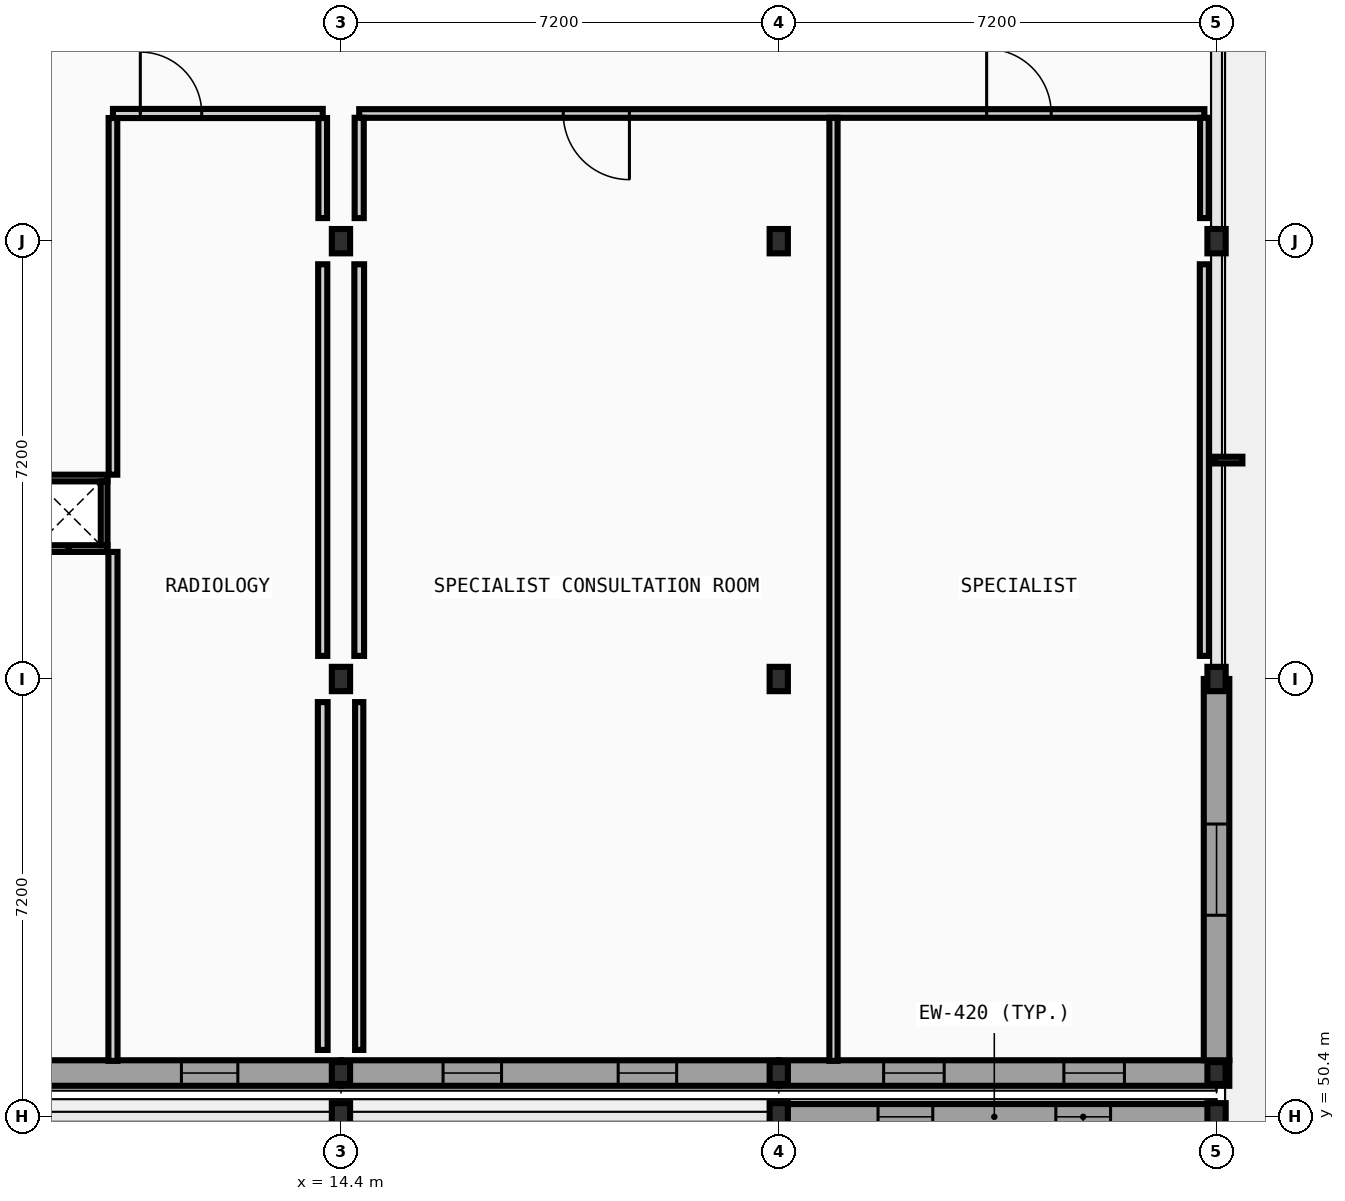
"""IFC4 building model, lengths in metres.
Left out: names, types, materials, properties, quantities, classifications, styles, units other than length and angle.
Written with IfcOpenShell. Run it as: python <this file> out.ifc"""

import sys

from ifc_helpers import new_model, si_unit, direction, frame, frame_2d, origin, origin_2d, place, context, subcontext, project, spatial, rectangle, i_section, extrude, element, fill, save


model = new_model("IFC4")
c1 = context("Model", 3, precision=1e-05, world=origin(), true_north=direction((0.0, 1.0)))
c2 = subcontext(c1, "Body", "Model", "MODEL_VIEW")
j1 = project(units=[si_unit("LENGTHUNIT", "METRE"), si_unit("PLANEANGLEUNIT", "RADIAN")], contexts=[c1])
p1 = place(None, origin())
s1 = spatial("IfcSite", under=j1, at=p1, CompositionType="ELEMENT")
p2 = place(p1, origin())
s2 = spatial("IfcBuilding", under=s1, at=p2, CompositionType="ELEMENT")
p3 = place(p2, origin())
s3 = spatial("IfcBuildingStorey", under=s2, at=p3, CompositionType="ELEMENT", Elevation=0.0)
p4 = place(p3, frame((14.4, 50.4, 0.0), z_axis=(0.0, 0.0, 1.0), x_axis=(1.0, 0.0, 0.0)))
e1 = element("IfcColumn", 1, at=p4, inside=s3, PredefinedType="COLUMN", context=c2, shape_type="SweptSolid", body=[
    extrude(i_section(OverallWidth=0.3, OverallDepth=0.45, WebThickness=0.014, FlangeThickness=0.026, FilletRadius=0.027, at=origin_2d()), origin(), (0.0, 0.0, 1.0), 5.2),
])
p5 = place(p3, frame((14.4, 51.12, 0.0), z_axis=(0.0, 0.0, 1.0), x_axis=(1.0, 0.0, 0.0)))
e2 = element("IfcColumn", 2, at=p5, inside=s3, PredefinedType="COLUMN", context=c2, shape_type="SweptSolid", body=[
    extrude(i_section(OverallWidth=0.3, OverallDepth=0.36, WebThickness=0.012, FlangeThickness=0.022, FilletRadius=0.027, at=origin_2d()), origin(), (0.0, 0.0, 1.0), 5.2),
])
for number, where, z_axis, x_axis in (
    (3, (14.4, 57.6, 0.0), (0.0, 0.0, 1.0), (1.0, 0.0, 0.0)),
    (4, (14.4, 64.8, 0.0), (0.0, 0.0, 1.0), (1.0, 0.0, 0.0)),
):
    element("IfcColumn", number, at=place(p3, frame(where, z_axis=z_axis, x_axis=x_axis)), inside=s3, PredefinedType="COLUMN", context=c2, shape_type="SweptSolid", body=[
        extrude(i_section(OverallWidth=0.3, OverallDepth=0.4, WebThickness=0.013, FlangeThickness=0.024, FilletRadius=0.027, at=origin_2d()), origin(), (0.0, 0.0, 1.0), 5.2),
    ])
p6 = place(p3, frame((21.6, 50.4, 0.0), z_axis=(0.0, 0.0, 1.0), x_axis=(1.0, 0.0, 0.0)))
e5 = element("IfcColumn", 5, at=p6, inside=s3, PredefinedType="COLUMN", context=c2, shape_type="SweptSolid", body=[
    extrude(i_section(OverallWidth=0.3, OverallDepth=0.45, WebThickness=0.014, FlangeThickness=0.026, FilletRadius=0.027, at=origin_2d()), origin(), (0.0, 0.0, 1.0), 5.2),
])
p7 = place(p3, frame((21.6, 51.12, 0.0), z_axis=(0.0, 0.0, 1.0), x_axis=(1.0, 0.0, 0.0)))
e6 = element("IfcColumn", 6, at=p7, inside=s3, PredefinedType="COLUMN", context=c2, shape_type="SweptSolid", body=[
    extrude(i_section(OverallWidth=0.3, OverallDepth=0.36, WebThickness=0.012, FlangeThickness=0.022, FilletRadius=0.027, at=origin_2d()), origin(), (0.0, 0.0, 1.0), 5.2),
])
for number, where, z_axis, x_axis in (
    (7, (21.6, 57.6, 0.0), (0.0, 0.0, 1.0), (1.0, 0.0, 0.0)),
    (8, (21.6, 64.8, 0.0), (0.0, 0.0, 1.0), (1.0, 0.0, 0.0)),
):
    element("IfcColumn", number, at=place(p3, frame(where, z_axis=z_axis, x_axis=x_axis)), inside=s3, PredefinedType="COLUMN", context=c2, shape_type="SweptSolid", body=[
        extrude(i_section(OverallWidth=0.3, OverallDepth=0.4, WebThickness=0.013, FlangeThickness=0.024, FilletRadius=0.027, at=origin_2d()), origin(), (0.0, 0.0, 1.0), 5.2),
    ])
p8 = place(p3, frame((28.8, 50.4, 0.0), z_axis=(0.0, 0.0, 1.0), x_axis=(1.0, 0.0, 0.0)))
e9 = element("IfcColumn", 9, at=p8, inside=s3, PredefinedType="COLUMN", context=c2, shape_type="SweptSolid", body=[
    extrude(i_section(OverallWidth=0.3, OverallDepth=0.45, WebThickness=0.014, FlangeThickness=0.026, FilletRadius=0.027, at=origin_2d()), origin(), (0.0, 0.0, 1.0), 5.2),
])
p9 = place(p3, frame((28.8, 51.12, 0.0), z_axis=(0.0, 0.0, 1.0), x_axis=(1.0, 0.0, 0.0)))
e10 = element("IfcColumn", 10, at=p9, inside=s3, PredefinedType="COLUMN", context=c2, shape_type="SweptSolid", body=[
    extrude(i_section(OverallWidth=0.3, OverallDepth=0.36, WebThickness=0.012, FlangeThickness=0.022, FilletRadius=0.027, at=origin_2d()), origin(), (0.0, 0.0, 1.0), 5.2),
])
for number, where, z_axis, x_axis in (
    (11, (28.8, 57.6, 0.0), (0.0, 0.0, 1.0), (1.0, 0.0, 0.0)),
    (12, (28.8, 64.8, 0.0), (0.0, 0.0, 1.0), (1.0, 0.0, 0.0)),
):
    element("IfcColumn", number, at=place(p3, frame(where, z_axis=z_axis, x_axis=x_axis)), inside=s3, PredefinedType="COLUMN", context=c2, shape_type="SweptSolid", body=[
        extrude(i_section(OverallWidth=0.3, OverallDepth=0.4, WebThickness=0.013, FlangeThickness=0.024, FilletRadius=0.027, at=origin_2d()), origin(), (0.0, 0.0, 1.0), 5.2),
    ])
p10 = place(p3, frame((28.8, 50.4, 0.0), z_axis=(0.0, 0.0, 1.0), x_axis=(-1.0, 0.0, 0.0)))
e13 = element("IfcWall", 13, at=p10, inside=s3, PredefinedType="STANDARD", context=c2, shape_type="SweptSolid", body=[
    extrude(rectangle(XDim=7.31, YDim=0.42, at=frame_2d((3.655, 0.0))), origin(), (0.0, 0.0, 1.0), 4.665),
])
p11 = place(p10, frame((1.743, 0.0, 1.1)))
e14 = element("IfcOpeningElement", 14, at=p11, cuts=e13, PredefinedType="OPENING", context=c2, shape_type="SweptSolid", body=[
    extrude(rectangle(XDim=0.9, YDim=1.6, at=frame_2d((0.45, 0.8))), frame((0.0, 0.22, 0.0), z_axis=(0.0, -1.0, 0.0), x_axis=(1.0, 0.0, 0.0)), (0.0, 0.0, 1.0), 0.44),
])
p12 = place(p10, frame((4.667, 0.0, 1.1)))
e15 = element("IfcOpeningElement", 15, at=p12, cuts=e13, PredefinedType="OPENING", context=c2, shape_type="SweptSolid", body=[
    extrude(rectangle(XDim=0.9, YDim=1.6, at=frame_2d((0.45, 0.8))), frame((0.0, 0.22, 0.0), z_axis=(0.0, -1.0, 0.0), x_axis=(1.0, 0.0, 0.0)), (0.0, 0.0, 1.0), 0.44),
])
p13 = place(p3, frame((7.2, 51.12, 0.0), z_axis=(0.0, 0.0, 1.0), x_axis=(1.0, 0.0, 0.0)))
e16 = element("IfcWall", 16, at=p13, inside=s3, PredefinedType="STANDARD", context=c2, shape_type="SweptSolid", body=[
    extrude(rectangle(XDim=7.2, YDim=0.42, at=frame_2d((3.6, 0.0))), origin(), (0.0, 0.0, 1.0), 4.635),
])
p14 = place(p13, frame((4.576, 0.0, 0.95)))
e17 = element("IfcOpeningElement", 17, at=p14, cuts=e16, PredefinedType="OPENING", context=c2, shape_type="SweptSolid", body=[
    extrude(rectangle(XDim=0.928, YDim=1.404, at=frame_2d((0.464, 0.702))), frame((0.0, 0.22, 0.0), z_axis=(0.0, -1.0, 0.0), x_axis=(1.0, 0.0, 0.0)), (0.0, 0.0, 1.0), 0.44),
])
p15 = place(p3, frame((14.4, 51.12, 0.0), z_axis=(0.0, 0.0, 1.0), x_axis=(1.0, 0.0, 0.0)))
e18 = element("IfcWall", 18, at=p15, inside=s3, PredefinedType="STANDARD", context=c2, shape_type="SweptSolid", body=[
    extrude(rectangle(XDim=7.2, YDim=0.42, at=frame_2d((3.6, 0.0))), origin(), (0.0, 0.0, 1.0), 4.635),
])
p16 = place(p15, frame((1.679, 0.0, 0.95)))
e19 = element("IfcOpeningElement", 19, at=p16, cuts=e18, PredefinedType="OPENING", context=c2, shape_type="SweptSolid", body=[
    extrude(rectangle(XDim=0.962, YDim=1.404, at=frame_2d((0.481, 0.702))), frame((0.0, 0.22, 0.0), z_axis=(0.0, -1.0, 0.0), x_axis=(1.0, 0.0, 0.0)), (0.0, 0.0, 1.0), 0.44),
])
p17 = place(p15, frame((4.559, 0.0, 0.95)))
e20 = element("IfcOpeningElement", 20, at=p17, cuts=e18, PredefinedType="OPENING", context=c2, shape_type="SweptSolid", body=[
    extrude(rectangle(XDim=0.962, YDim=1.404, at=frame_2d((0.481, 0.702))), frame((0.0, 0.22, 0.0), z_axis=(0.0, -1.0, 0.0), x_axis=(1.0, 0.0, 0.0)), (0.0, 0.0, 1.0), 0.44),
])
p18 = place(p3, frame((21.6, 51.12, 0.0), z_axis=(0.0, 0.0, 1.0), x_axis=(1.0, 0.0, 0.0)))
e21 = element("IfcWall", 21, at=p18, inside=s3, PredefinedType="STANDARD", context=c2, shape_type="SweptSolid", body=[
    extrude(rectangle(XDim=7.41, YDim=0.42, at=frame_2d((3.705, 0.0))), origin(), (0.0, 0.0, 1.0), 4.635),
])
p19 = place(p18, frame((1.725, 0.0, 0.95)))
e22 = element("IfcOpeningElement", 22, at=p19, cuts=e21, PredefinedType="OPENING", context=c2, shape_type="SweptSolid", body=[
    extrude(rectangle(XDim=0.996, YDim=1.404, at=frame_2d((0.498, 0.702))), frame((0.0, 0.22, 0.0), z_axis=(0.0, -1.0, 0.0), x_axis=(1.0, 0.0, 0.0)), (0.0, 0.0, 1.0), 0.44),
])
p20 = place(p18, frame((4.689, 0.0, 0.95)))
e23 = element("IfcOpeningElement", 23, at=p20, cuts=e21, PredefinedType="OPENING", context=c2, shape_type="SweptSolid", body=[
    extrude(rectangle(XDim=0.996, YDim=1.404, at=frame_2d((0.498, 0.702))), frame((0.0, 0.22, 0.0), z_axis=(0.0, -1.0, 0.0), x_axis=(1.0, 0.0, 0.0)), (0.0, 0.0, 1.0), 0.44),
])
p21 = place(p3, frame((28.8, 51.33, 0.0), z_axis=(0.0, 0.0, 1.0), x_axis=(0.0, 1.0, 0.0)))
e24 = element("IfcWall", 24, at=p21, inside=s3, PredefinedType="STANDARD", context=c2, shape_type="SweptSolid", body=[
    extrude(rectangle(XDim=6.27, YDim=0.42, at=frame_2d((3.135, 0.0))), origin(), (0.0, 0.0, 1.0), 4.565),
])
p22 = place(p21, frame((2.385, 0.0, 1.05)))
e25 = element("IfcOpeningElement", 25, at=p22, cuts=e24, PredefinedType="OPENING", context=c2, shape_type="SweptSolid", body=[
    extrude(rectangle(XDim=1.5, YDim=1.5, at=frame_2d((0.75, 0.75))), frame((0.0, 0.22, 0.0), z_axis=(0.0, -1.0, 0.0), x_axis=(1.0, 0.0, 0.0)), (0.0, 0.0, 1.0), 0.44),
])
for number, where, z_axis, x_axis in (
    (26, (9.29, 59.745, 0.0), (0.0, 0.0, 1.0), (1.0, 0.0, 0.0)),
    (27, (9.29, 60.905, 0.0), (0.0, 0.0, 1.0), (1.0, 0.0, 0.0)),
):
    element("IfcWall", number, at=place(p3, frame(where, z_axis=z_axis, x_axis=x_axis)), inside=s3, PredefinedType="PARTITIONING", context=c2, shape_type="SweptSolid", body=[
        extrude(rectangle(XDim=1.27, YDim=0.11, at=frame_2d((0.635, 0.0))), origin(), (0.0, 0.0, 1.0), 4.94),
    ])
p23 = place(p3, frame((10.505, 59.8, 0.0), z_axis=(0.0, 0.0, 1.0), x_axis=(0.0, 1.0, 0.0)))
e28 = element("IfcWall", 28, at=p23, inside=s3, PredefinedType="PARTITIONING", context=c2, shape_type="SweptSolid", body=[
    extrude(rectangle(XDim=1.05, YDim=0.11, at=frame_2d((0.525, 0.0))), origin(), (0.0, 0.0, 1.0), 4.94),
])
p24 = place(p3, frame((10.65, 66.9, 0.0), z_axis=(0.0, 0.0, 1.0), x_axis=(1.0, 0.0, 0.0)))
e29 = element("IfcWall", 29, at=p24, inside=s3, PredefinedType="PARTITIONING", context=c2, shape_type="SweptSolid", body=[
    extrude(rectangle(XDim=3.45, YDim=0.15, at=frame_2d((1.725, 0.0))), origin(), (0.0, 0.0, 1.0), 4.94),
])
p25 = place(p24, frame((0.45, 0.0, 0.0)))
e30 = element("IfcOpeningElement", 30, at=p25, cuts=e29, PredefinedType="OPENING", context=c2, shape_type="SweptSolid", body=[
    extrude(rectangle(XDim=1.01, YDim=2.096, at=frame_2d((0.505, 1.048))), frame((0.0, 0.085, 0.0), z_axis=(0.0, -1.0, 0.0), x_axis=(1.0, 0.0, 0.0)), (0.0, 0.0, 1.0), 0.17),
])
p26 = place(p3, frame((14.7, 66.9, 0.0), z_axis=(0.0, 0.0, 1.0), x_axis=(1.0, 0.0, 0.0)))
e31 = element("IfcWall", 31, at=p26, inside=s3, PredefinedType="PARTITIONING", context=c2, shape_type="SweptSolid", body=[
    extrude(rectangle(XDim=13.9, YDim=0.142, at=frame_2d((6.95, 0.0))), origin(), (0.0, 0.0, 1.0), 4.94),
])
p27 = place(p26, frame((10.319, 0.0, 0.0)))
e32 = element("IfcOpeningElement", 32, at=p27, cuts=e31, PredefinedType="OPENING", context=c2, shape_type="SweptSolid", body=[
    extrude(rectangle(XDim=1.062, YDim=2.096, at=frame_2d((0.531, 1.048))), frame((0.0, 0.081, 0.0), z_axis=(0.0, -1.0, 0.0), x_axis=(1.0, 0.0, 0.0)), (0.0, 0.0, 1.0), 0.162),
])
p28 = place(p26, frame((3.356, 0.0, 0.0)))
e33 = element("IfcOpeningElement", 33, at=p28, cuts=e31, PredefinedType="OPENING", context=c2, shape_type="SweptSolid", body=[
    extrude(rectangle(XDim=1.088, YDim=2.096, at=frame_2d((0.544, 1.048))), frame((0.0, 0.081, 0.0), z_axis=(0.0, -1.0, 0.0), x_axis=(1.0, 0.0, 0.0)), (0.0, 0.0, 1.0), 0.162),
])
p29 = place(p3, frame((10.65, 51.32, 0.0), z_axis=(0.0, 0.0, 1.0), x_axis=(0.0, 1.0, 0.0)))
e34 = element("IfcWall", 34, at=p29, inside=s3, PredefinedType="PARTITIONING", context=c2, shape_type="SweptSolid", body=[
    extrude(rectangle(XDim=8.37, YDim=0.15, at=frame_2d((4.185, 0.0))), origin(), (0.0, 0.0, 1.0), 4.94),
])
p30 = place(p3, frame((10.65, 60.96, 0.0), z_axis=(0.0, 0.0, 1.0), x_axis=(0.0, 1.0, 0.0)))
e35 = element("IfcWall", 35, at=p30, inside=s3, PredefinedType="PARTITIONING", context=c2, shape_type="SweptSolid", body=[
    extrude(rectangle(XDim=5.865, YDim=0.142, at=frame_2d((2.933, 0.0))), origin(), (0.0, 0.0, 1.0), 4.94),
])
p31 = place(p3, frame((14.1, 51.5, 0.0), z_axis=(0.0, 0.0, 1.0), x_axis=(0.0, 1.0, 0.0)))
e36 = element("IfcWall", 36, at=p31, inside=s3, PredefinedType="PARTITIONING", context=c2, shape_type="SweptSolid", body=[
    extrude(rectangle(XDim=5.72, YDim=0.16, at=frame_2d((2.86, 0.0))), origin(), (0.0, 0.0, 1.0), 4.635),
])
p32 = place(p3, frame((14.1, 57.98, 0.0), z_axis=(0.0, 0.0, 1.0), x_axis=(0.0, 1.0, 0.0)))
e37 = element("IfcWall", 37, at=p32, inside=s3, PredefinedType="PARTITIONING", context=c2, shape_type="SweptSolid", body=[
    extrude(rectangle(XDim=6.44, YDim=0.15, at=frame_2d((3.22, 0.0))), origin(), (0.0, 0.0, 1.0), 4.635),
])
p33 = place(p3, frame((14.1, 65.18, 0.0), z_axis=(0.0, 0.0, 1.0), x_axis=(0.0, 1.0, 0.0)))
e38 = element("IfcWall", 38, at=p33, inside=s3, PredefinedType="PARTITIONING", context=c2, shape_type="SweptSolid", body=[
    extrude(rectangle(XDim=1.645, YDim=0.142, at=frame_2d((0.823, 0.0))), origin(), (0.0, 0.0, 1.0), 4.635),
])
p34 = place(p3, frame((14.7, 51.5, 0.0), z_axis=(0.0, 0.0, 1.0), x_axis=(0.0, 1.0, 0.0)))
e39 = element("IfcWall", 39, at=p34, inside=s3, PredefinedType="PARTITIONING", context=c2, shape_type="SweptSolid", body=[
    extrude(rectangle(XDim=5.72, YDim=0.135, at=frame_2d((2.86, 0.0))), origin(), (0.0, 0.0, 1.0), 4.94),
])
p35 = place(p3, frame((14.7, 57.98, 0.0), z_axis=(0.0, 0.0, 1.0), x_axis=(0.0, 1.0, 0.0)))
e40 = element("IfcWall", 40, at=p35, inside=s3, PredefinedType="PARTITIONING", context=c2, shape_type="SweptSolid", body=[
    extrude(rectangle(XDim=6.44, YDim=0.16, at=frame_2d((3.22, 0.0))), origin(), (0.0, 0.0, 1.0), 4.635),
])
p36 = place(p3, frame((14.7, 65.18, 0.0), z_axis=(0.0, 0.0, 1.0), x_axis=(0.0, 1.0, 0.0)))
e41 = element("IfcWall", 41, at=p36, inside=s3, PredefinedType="PARTITIONING", context=c2, shape_type="SweptSolid", body=[
    extrude(rectangle(XDim=1.649, YDim=0.15, at=frame_2d((0.825, 0.0))), origin(), (0.0, 0.0, 1.0), 4.635),
])
p37 = place(p3, frame((22.5, 51.32, 0.0), z_axis=(0.0, 0.0, 1.0), x_axis=(0.0, 1.0, 0.0)))
e42 = element("IfcWall", 42, at=p37, inside=s3, PredefinedType="PARTITIONING", context=c2, shape_type="SweptSolid", body=[
    extrude(rectangle(XDim=15.509, YDim=0.135, at=frame_2d((7.754, 0.0))), origin(), (0.0, 0.0, 1.0), 4.94),
])
p38 = place(p3, frame((28.6, 57.98, 0.0), z_axis=(0.0, 0.0, 1.0), x_axis=(0.0, 1.0, 0.0)))
e43 = element("IfcWall", 43, at=p38, inside=s3, PredefinedType="PARTITIONING", context=c2, shape_type="SweptSolid", body=[
    extrude(rectangle(XDim=6.44, YDim=0.15, at=frame_2d((3.22, 0.0))), origin(), (0.0, 0.0, 1.0), 4.565),
])
p39 = place(p3, frame((28.6, 65.18, 0.0), z_axis=(0.0, 0.0, 1.0), x_axis=(0.0, 1.0, 0.0)))
e44 = element("IfcWall", 44, at=p39, inside=s3, PredefinedType="PARTITIONING", context=c2, shape_type="SweptSolid", body=[
    extrude(rectangle(XDim=1.649, YDim=0.142, at=frame_2d((0.825, 0.0))), origin(), (0.0, 0.0, 1.0), 4.565),
])
p40 = place(p11, origin())
e45 = element("IfcWindow", 45, at=p40, inside=s3, PartitioningType="SINGLE_PANEL", PredefinedType="WINDOW", context=c2, shape_type="SweptSolid", body=[
    extrude(rectangle(XDim=0.9, YDim=1.6, at=frame_2d((0.45, 0.8))), frame((0.0, 0.03, 0.0), z_axis=(0.0, -1.0, 0.0), x_axis=(1.0, 0.0, 0.0)), (0.0, 0.0, 1.0), 0.06),
])
fill(e14, e45)
p41 = place(p12, origin())
e46 = element("IfcWindow", 46, at=p41, inside=s3, PartitioningType="SINGLE_PANEL", PredefinedType="WINDOW", context=c2, shape_type="SweptSolid", body=[
    extrude(rectangle(XDim=0.9, YDim=1.6, at=frame_2d((0.45, 0.8))), frame((0.0, 0.03, 0.0), z_axis=(0.0, -1.0, 0.0), x_axis=(1.0, 0.0, 0.0)), (0.0, 0.0, 1.0), 0.06),
])
fill(e15, e46)
p42 = place(p14, origin())
e47 = element("IfcWindow", 47, at=p42, inside=s3, PartitioningType="SINGLE_PANEL", PredefinedType="WINDOW", context=c2, shape_type="SweptSolid", body=[
    extrude(rectangle(XDim=0.928, YDim=1.404, at=frame_2d((0.464, 0.702))), frame((0.0, 0.03, 0.0), z_axis=(0.0, -1.0, 0.0), x_axis=(1.0, 0.0, 0.0)), (0.0, 0.0, 1.0), 0.06),
])
fill(e17, e47)
p43 = place(p16, origin())
e48 = element("IfcWindow", 48, at=p43, inside=s3, PartitioningType="SINGLE_PANEL", PredefinedType="WINDOW", context=c2, shape_type="SweptSolid", body=[
    extrude(rectangle(XDim=0.962, YDim=1.404, at=frame_2d((0.481, 0.702))), frame((0.0, 0.03, 0.0), z_axis=(0.0, -1.0, 0.0), x_axis=(1.0, 0.0, 0.0)), (0.0, 0.0, 1.0), 0.06),
])
fill(e19, e48)
p44 = place(p17, origin())
e49 = element("IfcWindow", 49, at=p44, inside=s3, PartitioningType="SINGLE_PANEL", PredefinedType="WINDOW", context=c2, shape_type="SweptSolid", body=[
    extrude(rectangle(XDim=0.962, YDim=1.404, at=frame_2d((0.481, 0.702))), frame((0.0, 0.03, 0.0), z_axis=(0.0, -1.0, 0.0), x_axis=(1.0, 0.0, 0.0)), (0.0, 0.0, 1.0), 0.06),
])
fill(e20, e49)
p45 = place(p19, origin())
e50 = element("IfcWindow", 50, at=p45, inside=s3, PartitioningType="SINGLE_PANEL", PredefinedType="WINDOW", context=c2, shape_type="SweptSolid", body=[
    extrude(rectangle(XDim=0.996, YDim=1.404, at=frame_2d((0.498, 0.702))), frame((0.0, 0.03, 0.0), z_axis=(0.0, -1.0, 0.0), x_axis=(1.0, 0.0, 0.0)), (0.0, 0.0, 1.0), 0.06),
])
fill(e22, e50)
p46 = place(p20, origin())
e51 = element("IfcWindow", 51, at=p46, inside=s3, PartitioningType="SINGLE_PANEL", PredefinedType="WINDOW", context=c2, shape_type="SweptSolid", body=[
    extrude(rectangle(XDim=0.996, YDim=1.404, at=frame_2d((0.498, 0.702))), frame((0.0, 0.03, 0.0), z_axis=(0.0, -1.0, 0.0), x_axis=(1.0, 0.0, 0.0)), (0.0, 0.0, 1.0), 0.06),
])
fill(e23, e51)
p47 = place(p22, origin())
e52 = element("IfcWindow", 52, at=p47, inside=s3, PartitioningType="SINGLE_PANEL", PredefinedType="WINDOW", context=c2, shape_type="SweptSolid", body=[
    extrude(rectangle(XDim=1.5, YDim=1.5, at=frame_2d((0.75, 0.75))), frame((0.0, 0.03, 0.0), z_axis=(0.0, -1.0, 0.0), x_axis=(1.0, 0.0, 0.0)), (0.0, 0.0, 1.0), 0.06),
])
fill(e25, e52)
p48 = place(p25, origin())
e53 = element("IfcDoor", 53, at=p48, inside=s3, OperationType="SINGLE_SWING_LEFT", PredefinedType="DOOR", context=c2, shape_type="SweptSolid", body=[
    extrude(rectangle(XDim=1.01, YDim=2.096, at=frame_2d((0.505, 1.048))), frame((0.0, 0.025, 0.0), z_axis=(0.0, -1.0, 0.0), x_axis=(1.0, 0.0, 0.0)), (0.0, 0.0, 1.0), 0.05),
])
fill(e30, e53)
p49 = place(p27, origin())
e54 = element("IfcDoor", 54, at=p49, inside=s3, OperationType="SINGLE_SWING_LEFT", PredefinedType="DOOR", context=c2, shape_type="SweptSolid", body=[
    extrude(rectangle(XDim=1.062, YDim=2.096, at=frame_2d((0.531, 1.048))), frame((0.0, 0.025, 0.0), z_axis=(0.0, -1.0, 0.0), x_axis=(1.0, 0.0, 0.0)), (0.0, 0.0, 1.0), 0.05),
])
fill(e32, e54)
p50 = place(p28, origin())
e55 = element("IfcDoor", 55, at=p50, inside=s3, OperationType="SINGLE_SWING_RIGHT", PredefinedType="DOOR", context=c2, shape_type="SweptSolid", body=[
    extrude(rectangle(XDim=1.088, YDim=2.096, at=frame_2d((0.544, 1.048))), frame((0.0, 0.025, 0.0), z_axis=(0.0, -1.0, 0.0), x_axis=(1.0, 0.0, 0.0)), (0.0, 0.0, 1.0), 0.05),
])
fill(e33, e55)
save(model, sys.argv[1])
